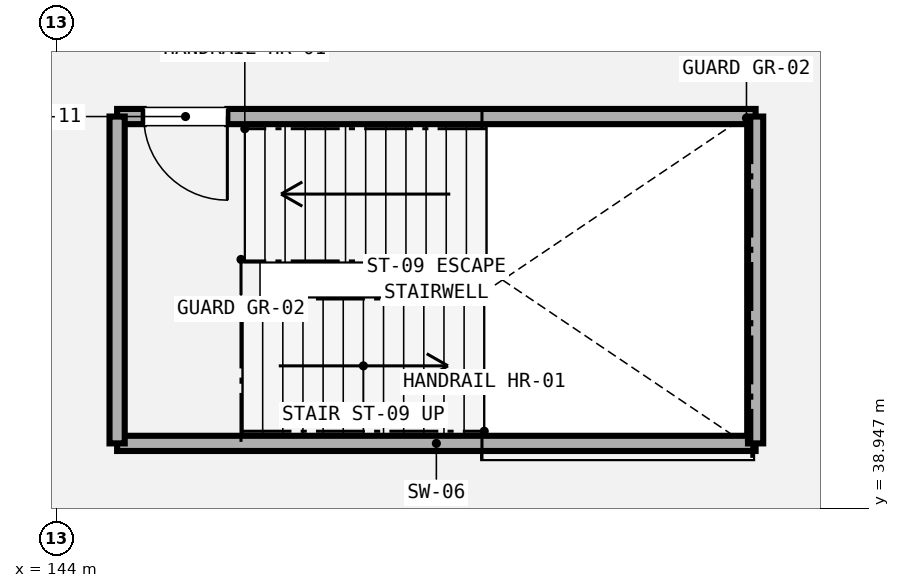
"""IFC4 building model, lengths in metres.
Left out: names, types, materials, properties, quantities, classifications, styles, units other than length and angle.
Written with IfcOpenShell. Run it as: python <this file> out.ifc"""

import sys

from ifc_helpers import new_model, si_unit, direction, frame, frame_2d, origin, place, context, subcontext, project, spatial, rectangle, extrude, element, fill, save


model = new_model("IFC4")
c1 = context("Model", 3, precision=1e-05, world=origin(), true_north=direction((0.0, 1.0)))
c2 = subcontext(c1, "Body", "Model", "MODEL_VIEW")
j1 = project(units=[si_unit("LENGTHUNIT", "METRE"), si_unit("PLANEANGLEUNIT", "RADIAN")], contexts=[c1])
p1 = place(None, origin())
s1 = spatial("IfcSite", under=j1, at=p1, CompositionType="ELEMENT")
p2 = place(p1, origin())
s2 = spatial("IfcBuilding", under=s1, at=p2, CompositionType="ELEMENT")
p3 = place(p2, frame((0.0, 0.0, 5.4)))
s3 = spatial("IfcBuildingStorey", under=s2, at=p3, CompositionType="ELEMENT", Elevation=5.4)
p4 = place(p3, frame((144.8, 39.8, 0.0), z_axis=(0.0, 0.0, 1.0), x_axis=(1.0, 0.0, 0.0)))
e1 = element("IfcWall", 1, at=p4, inside=s3, PredefinedType="SHEAR", context=c2, shape_type="SweptSolid", body=[
    extrude(rectangle(XDim=8.4, YDim=0.2, at=frame_2d((4.2, 0.0))), origin(), (0.0, 0.0, 1.0), 3.88),
])
p5 = place(p3, frame((144.8, 44.1, 0.0), z_axis=(0.0, 0.0, 1.0), x_axis=(1.0, 0.0, 0.0)))
e2 = element("IfcWall", 2, at=p5, inside=s3, PredefinedType="SHEAR", context=c2, shape_type="SweptSolid", body=[
    extrude(rectangle(XDim=8.4, YDim=0.2, at=frame_2d((4.2, 0.0))), origin(), (0.0, 0.0, 1.0), 3.88),
])
p6 = place(p5, frame((0.35, 0.0, 0.0)))
e3 = element("IfcOpeningElement", 3, at=p6, cuts=e2, PredefinedType="OPENING", context=c2, shape_type="SweptSolid", body=[
    extrude(rectangle(XDim=1.1, YDim=2.2, at=frame_2d((0.55, 1.1))), frame((0.0, 0.11, 0.0), z_axis=(0.0, -1.0, 0.0), x_axis=(1.0, 0.0, 0.0)), (0.0, 0.0, 1.0), 0.22),
])
for number, where, z_axis, x_axis in (
    (4, (144.8, 39.8, 0.0), (0.0, 0.0, 1.0), (0.0, 1.0, 0.0)),
    (5, (153.2, 39.8, 0.0), (0.0, 0.0, 1.0), (0.0, 1.0, 0.0)),
):
    element("IfcWall", number, at=place(p3, frame(where, z_axis=z_axis, x_axis=x_axis)), inside=s3, PredefinedType="SHEAR", context=c2, shape_type="SweptSolid", body=[
        extrude(rectangle(XDim=4.3, YDim=0.2, at=frame_2d((2.15, 0.0))), origin(), (0.0, 0.0, 1.0), 3.88),
    ])
p7 = place(p6, frame((1.1, 0.0, 0.0), z_axis=(0.0, 0.0, 1.0), x_axis=(-1.0, 0.0, 0.0)))
e6 = element("IfcDoor", 6, at=p7, inside=s3, OperationType="SINGLE_SWING_LEFT", PredefinedType="DOOR", context=c2, shape_type="SweptSolid", body=[
    extrude(rectangle(XDim=1.1, YDim=2.2, at=frame_2d((0.55, 1.1))), frame((0.0, 0.025, 0.0), z_axis=(0.0, -1.0, 0.0), x_axis=(1.0, 0.0, 0.0)), (0.0, 0.0, 1.0), 0.05),
])
fill(e3, e6)
save(model, sys.argv[1])
